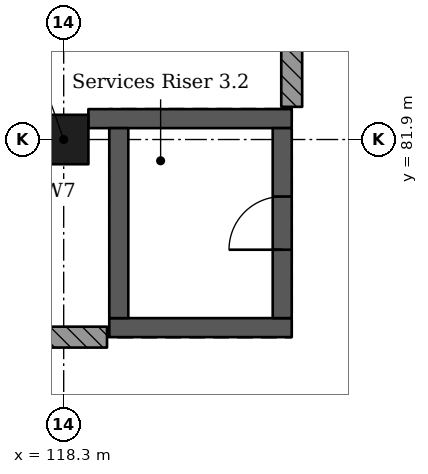
"""IFC4 building model, lengths in metres.
Left out: names, types, materials, properties, quantities, classifications, styles, units other than length and angle.
Written with IfcOpenShell. Run it as: python <this file> out.ifc"""

import sys

from ifc_helpers import new_model, si_unit, direction, frame, frame_2d, origin, origin_2d, place, context, subcontext, project, spatial, rectangle, extrude, element, fill, save


model = new_model("IFC4")
c1 = context("Model", 3, precision=1e-05, world=origin(), true_north=direction((0.0, 1.0)))
c2 = subcontext(c1, "Body", "Model", "MODEL_VIEW")
j1 = project(units=[si_unit("LENGTHUNIT", "METRE"), si_unit("PLANEANGLEUNIT", "RADIAN")], contexts=[c1])
p1 = place(None, origin())
s1 = spatial("IfcSite", under=j1, at=p1, CompositionType="ELEMENT")
p2 = place(p1, origin())
s2 = spatial("IfcBuilding", under=s1, at=p2, CompositionType="ELEMENT")
p3 = place(p2, frame((0.0, 0.0, 15.47)))
s3 = spatial("IfcBuildingStorey", under=s2, at=p3, CompositionType="ELEMENT", Elevation=15.47)
p4 = place(p3, frame((118.3, 81.9, 0.0), z_axis=(0.0, 0.0, 1.0), x_axis=(1.0, 0.0, 0.0)))
e1 = element("IfcColumn", 1, at=p4, inside=s3, PredefinedType="COLUMN", context=c2, shape_type="SweptSolid", body=[
    extrude(rectangle(XDim=0.65, YDim=0.65, at=origin_2d()), origin(), (0.0, 0.0, 1.0), 4.55),
])
p5 = place(p3, frame((121.3, 79.425, 0.0), z_axis=(0.0, 0.0, 1.0), x_axis=(-1.0, 0.0, 0.0)))
e2 = element("IfcWall", 2, at=p5, inside=s3, PredefinedType="SHEAR", context=c2, shape_type="SweptSolid", body=[
    extrude(rectangle(XDim=2.4, YDim=0.25, at=frame_2d((1.2, 0.0))), origin(), (0.0, 0.0, 1.0), 4.55),
])
p6 = place(p3, frame((121.3, 82.175, 0.0), z_axis=(0.0, 0.0, 1.0), x_axis=(-1.0, 0.0, 0.0)))
e3 = element("IfcWall", 3, at=p6, inside=s3, PredefinedType="SHEAR", context=c2, shape_type="SweptSolid", body=[
    extrude(rectangle(XDim=2.675, YDim=0.25, at=frame_2d((1.337, 0.0))), origin(), (0.0, 0.0, 1.0), 4.55),
])
p7 = place(p3, frame((119.025, 82.05, 0.0), z_axis=(0.0, 0.0, 1.0), x_axis=(0.0, -1.0, 0.0)))
e4 = element("IfcWall", 4, at=p7, inside=s3, PredefinedType="SHEAR", context=c2, shape_type="SweptSolid", body=[
    extrude(rectangle(XDim=2.5, YDim=0.25, at=frame_2d((1.25, 0.0))), origin(), (0.0, 0.0, 1.0), 4.55),
])
p8 = place(p3, frame((121.175, 82.05, 0.0), z_axis=(0.0, 0.0, 1.0), x_axis=(0.0, -1.0, 0.0)))
e5 = element("IfcWall", 5, at=p8, inside=s3, PredefinedType="SHEAR", context=c2, shape_type="SweptSolid", body=[
    extrude(rectangle(XDim=2.5, YDim=0.25, at=frame_2d((1.25, 0.0))), origin(), (0.0, 0.0, 1.0), 4.55),
])
p9 = place(p8, frame((0.9, 0.0, 0.0)))
e6 = element("IfcOpeningElement", 6, at=p9, cuts=e5, PredefinedType="OPENING", context=c2, shape_type="SweptSolid", body=[
    extrude(rectangle(XDim=0.7, YDim=2.1, at=frame_2d((0.35, 1.05))), frame((0.0, 0.135, 0.0), z_axis=(0.0, -1.0, 0.0), x_axis=(1.0, 0.0, 0.0)), (0.0, 0.0, 1.0), 0.27),
])
p10 = place(p3, frame((118.87, 79.3, 0.0), z_axis=(0.0, 0.0, 1.0), x_axis=(-1.0, 0.0, 0.0)))
e7 = element("IfcWall", 7, at=p10, inside=s3, PredefinedType="SOLIDWALL", context=c2, shape_type="SweptSolid", body=[
    extrude(rectangle(XDim=1.508, YDim=0.275, at=frame_2d((0.754, 0.0))), origin(), (0.0, 0.0, 1.0), 4.3),
])
p11 = place(p3, frame((121.3, 82.33, 0.0), z_axis=(0.0, 0.0, 1.0), x_axis=(0.0, 1.0, 0.0)))
e8 = element("IfcWall", 8, at=p11, inside=s3, PredefinedType="SOLIDWALL", context=c2, shape_type="SweptSolid", body=[
    extrude(rectangle(XDim=6.932, YDim=0.275, at=frame_2d((3.466, 0.0))), origin(), (0.0, 0.0, 1.0), 4.3),
])
p12 = place(p9, origin())
e9 = element("IfcDoor", 9, at=p12, inside=s3, OperationType="SINGLE_SWING_RIGHT", PredefinedType="DOOR", context=c2, shape_type="SweptSolid", body=[
    extrude(rectangle(XDim=0.7, YDim=2.1, at=frame_2d((0.35, 1.05))), frame((0.0, 0.025, 0.0), z_axis=(0.0, -1.0, 0.0), x_axis=(1.0, 0.0, 0.0)), (0.0, 0.0, 1.0), 0.05),
])
fill(e6, e9)
save(model, sys.argv[1])
